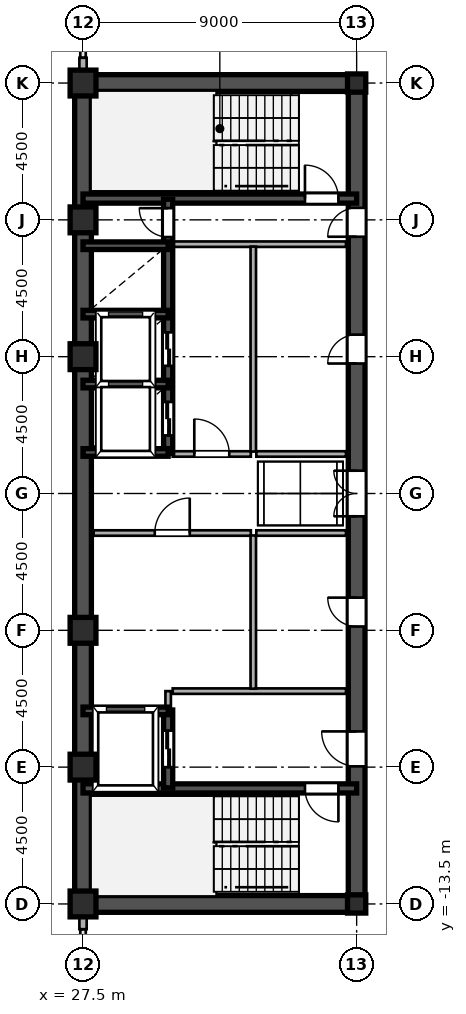
"""IFC4 building model, lengths in metres.
Left out: names, types, materials, properties, quantities, classifications, styles, units other than length and angle.
Written with IfcOpenShell. Run it as: python <this file> out.ifc"""

import sys

from ifc_helpers import new_model, si_unit, direction, frame, frame_2d, origin, origin_2d, place, context, subcontext, project, spatial, rectangle, hollow_rectangle, i_section, extrude, source, transform, mapped, element, fill, save


model = new_model("IFC4")
c1 = context("Model", 3, precision=1e-05, world=origin(), true_north=direction((0.0, 1.0)))
c2 = subcontext(c1, "Body", "Model", "MODEL_VIEW")
j1 = project(units=[si_unit("LENGTHUNIT", "METRE"), si_unit("PLANEANGLEUNIT", "RADIAN")], contexts=[c1])
p1 = place(None, origin())
s1 = spatial("IfcSite", under=j1, at=p1, CompositionType="ELEMENT")
p2 = place(p1, origin())
s2 = spatial("IfcBuilding", under=s1, at=p2, CompositionType="ELEMENT")
p3 = place(p2, frame((0.0, 0.0, 158.4)))
s3 = spatial("IfcBuildingStorey", under=s2, at=p3, CompositionType="ELEMENT", Elevation=158.4)
m1 = source(origin(), c2, "Body", "SweptSolid", [
    extrude(hollow_rectangle(XDim=0.85, YDim=0.85, WallThickness=0.036, at=origin_2d()), origin(), (0.0, 0.0, 1.0), 3.6),
])
for number, where, z_axis, x_axis in (
    (1, (27.5, -13.5, 0.0), (0.0, 0.0, 1.0), (1.0, 0.0, 0.0)),
    (2, (27.5, -9.0, 0.0), (0.0, 0.0, 1.0), (1.0, 0.0, 0.0)),
    (3, (27.5, -4.5, 0.0), (0.0, 0.0, 1.0), (1.0, 0.0, 0.0)),
    (4, (27.5, 4.5, 0.0), (0.0, 0.0, 1.0), (1.0, 0.0, 0.0)),
    (5, (27.5, 9.0, 0.0), (0.0, 0.0, 1.0), (1.0, 0.0, 0.0)),
    (6, (27.5, 13.5, 0.0), (0.0, 0.0, 1.0), (1.0, 0.0, 0.0)),
):
    element("IfcColumn", number, at=place(p3, frame(where, z_axis=z_axis, x_axis=x_axis)), inside=s3, PredefinedType="COLUMN", context=c2, shape_type="MappedRepresentation", body=[
        mapped(m1, transform((0.0, 0.0, 0.0), scale=1.0)),
    ])
m2 = source(origin(), c2, "Body", "SweptSolid", [
    extrude(i_section(OverallWidth=0.6, OverallDepth=0.6, WebThickness=0.025, FlangeThickness=0.04, at=origin_2d()), origin(), (0.0, 0.0, 1.0), 3.6),
])
for number, where, z_axis, x_axis in (
    (7, (36.5, -13.5, 0.0), (0.0, 0.0, 1.0), (1.0, 0.0, 0.0)),
    (8, (36.5, 13.5, 0.0), (0.0, 0.0, 1.0), (1.0, 0.0, 0.0)),
):
    element("IfcColumn", number, at=place(p3, frame(where, z_axis=z_axis, x_axis=x_axis)), inside=s3, PredefinedType="COLUMN", context=c2, shape_type="MappedRepresentation", body=[
        mapped(m2, transform((0.0, 0.0, 0.0), scale=1.0)),
    ])
for number, where, z_axis, x_axis in (
    (9, (27.5, -14.33, 0.0), (0.0, 0.0, 1.0), (0.0, 1.0, 0.0)),
    (10, (27.5, 13.78, 0.0), (0.0, 0.0, 1.0), (0.0, 1.0, 0.0)),
):
    element("IfcWall", number, at=place(p3, frame(where, z_axis=z_axis, x_axis=x_axis)), inside=s3, PredefinedType="SOLIDWALL", context=c2, shape_type="SweptSolid", body=[
        extrude(rectangle(XDim=0.55, YDim=0.24, at=frame_2d((0.275, 0.0))), origin(), (0.0, 0.0, 1.0), 2.84),
    ])
for number, where, z_axis, x_axis in (
    (11, (27.5, -13.5, 0.0), (0.0, 0.0, 1.0), (0.0, 1.0, 0.0)),
    (12, (27.5, 1.3, 0.0), (0.0, 0.0, 1.0), (0.0, 1.0, 0.0)),
):
    element("IfcWall", number, at=place(p3, frame(where, z_axis=z_axis, x_axis=x_axis)), inside=s3, PredefinedType="SHEAR", context=c2, shape_type="SweptSolid", body=[
        extrude(rectangle(XDim=12.2, YDim=0.55, at=frame_2d((6.1, 0.0))), origin(), (0.0, 0.0, 1.0), 3.34),
    ])
p4 = place(p3, frame((27.5, -1.3, 0.0), z_axis=(0.0, 0.0, 1.0), x_axis=(0.0, 1.0, 0.0)))
e13 = element("IfcWall", 13, at=p4, inside=s3, PredefinedType="SHEAR", context=c2, shape_type="SweptSolid", body=[
    extrude(rectangle(XDim=2.6, YDim=0.55, at=frame_2d((1.3, 0.0))), origin(), (0.0, 0.0, 1.0), 3.34),
])
for number, where, z_axis, x_axis in (
    (14, (27.5, -13.5, 0.0), (0.0, 0.0, 1.0), (1.0, 0.0, 0.0)),
    (15, (27.5, 13.5, 0.0), (0.0, 0.0, 1.0), (1.0, 0.0, 0.0)),
):
    element("IfcWall", number, at=place(p3, frame(where, z_axis=z_axis, x_axis=x_axis)), inside=s3, PredefinedType="SHEAR", context=c2, shape_type="SweptSolid", body=[
        extrude(rectangle(XDim=9.0, YDim=0.55, at=frame_2d((4.5, 0.0))), origin(), (0.0, 0.0, 1.0), 3.34),
    ])
p5 = place(p3, frame((36.5, -13.65, 0.0), z_axis=(0.0, 0.0, 1.0), x_axis=(0.0, 1.0, 0.0)))
e16 = element("IfcWall", 16, at=p5, inside=s3, PredefinedType="SHEAR", context=c2, shape_type="SweptSolid", body=[
    extrude(rectangle(XDim=7.15, YDim=0.55, at=frame_2d((3.575, 0.0))), origin(), (0.0, 0.0, 1.0), 3.34),
])
p6 = place(p5, frame((4.675, 0.0, 0.0)))
e17 = element("IfcOpeningElement", 17, at=p6, cuts=e16, PredefinedType="OPENING", context=c2, shape_type="SweptSolid", body=[
    extrude(rectangle(XDim=1.15, YDim=2.2, at=frame_2d((0.575, 1.1))), frame((0.0, 0.285, 0.0), z_axis=(0.0, -1.0, 0.0), x_axis=(1.0, 0.0, 0.0)), (0.0, 0.0, 1.0), 0.57),
])
p7 = place(p3, frame((36.5, -1.3, 0.0), z_axis=(0.0, 0.0, 1.0), x_axis=(0.0, 1.0, 0.0)))
e18 = element("IfcWall", 18, at=p7, inside=s3, PredefinedType="SHEAR", context=c2, shape_type="SweptSolid", body=[
    extrude(rectangle(XDim=2.6, YDim=0.55, at=frame_2d((1.3, 0.0))), origin(), (0.0, 0.0, 1.0), 3.34),
])
p8 = place(p7, frame((0.55, 0.0, 0.0)))
e19 = element("IfcOpeningElement", 19, at=p8, cuts=e18, PredefinedType="OPENING", context=c2, shape_type="SweptSolid", body=[
    extrude(rectangle(XDim=1.5, YDim=2.3, at=frame_2d((0.75, 1.15))), frame((0.0, 0.285, 0.0), z_axis=(0.0, -1.0, 0.0), x_axis=(1.0, 0.0, 0.0)), (0.0, 0.0, 1.0), 0.57),
])
p9 = place(p3, frame((36.5, 8.2, 0.0), z_axis=(0.0, 0.0, 1.0), x_axis=(0.0, 1.0, 0.0)))
e20 = element("IfcWall", 20, at=p9, inside=s3, PredefinedType="SHEAR", context=c2, shape_type="SweptSolid", body=[
    extrude(rectangle(XDim=5.45, YDim=0.55, at=frame_2d((2.725, 0.0))), origin(), (0.0, 0.0, 1.0), 3.34),
])
p10 = place(p9, frame((0.245, 0.0, 0.0)))
e21 = element("IfcOpeningElement", 21, at=p10, cuts=e20, PredefinedType="OPENING", context=c2, shape_type="SweptSolid", body=[
    extrude(rectangle(XDim=0.95, YDim=2.15, at=frame_2d((0.475, 1.075))), frame((0.0, 0.285, 0.0), z_axis=(0.0, -1.0, 0.0), x_axis=(1.0, 0.0, 0.0)), (0.0, 0.0, 1.0), 0.57),
])
p11 = place(p3, frame((36.5, -6.5, 0.0), z_axis=(0.0, 0.0, 1.0), x_axis=(0.0, 1.0, 0.0)))
e22 = element("IfcWall", 22, at=p11, inside=s3, PredefinedType="SHEAR", context=c2, shape_type="SweptSolid", body=[
    extrude(rectangle(XDim=5.2, YDim=0.55, at=frame_2d((2.6, 0.0))), origin(), (0.0, 0.0, 1.0), 3.34),
])
p12 = place(p11, frame((2.125, 0.0, 0.0)))
e23 = element("IfcOpeningElement", 23, at=p12, cuts=e22, PredefinedType="OPENING", context=c2, shape_type="SweptSolid", body=[
    extrude(rectangle(XDim=0.95, YDim=2.15, at=frame_2d((0.475, 1.075))), frame((0.0, 0.285, 0.0), z_axis=(0.0, -1.0, 0.0), x_axis=(1.0, 0.0, 0.0)), (0.0, 0.0, 1.0), 0.57),
])
p13 = place(p3, frame((36.5, 1.3, 0.0), z_axis=(0.0, 0.0, 1.0), x_axis=(0.0, 1.0, 0.0)))
e24 = element("IfcWall", 24, at=p13, inside=s3, PredefinedType="SHEAR", context=c2, shape_type="SweptSolid", body=[
    extrude(rectangle(XDim=6.9, YDim=0.55, at=frame_2d((3.45, 0.0))), origin(), (0.0, 0.0, 1.0), 3.34),
])
p14 = place(p13, frame((2.975, 0.0, 0.0)))
e25 = element("IfcOpeningElement", 25, at=p14, cuts=e24, PredefinedType="OPENING", context=c2, shape_type="SweptSolid", body=[
    extrude(rectangle(XDim=0.95, YDim=2.15, at=frame_2d((0.475, 1.075))), frame((0.0, 0.285, 0.0), z_axis=(0.0, -1.0, 0.0), x_axis=(1.0, 0.0, 0.0)), (0.0, 0.0, 1.0), 0.57),
])
p15 = place(p3, frame((27.5, -9.7, 0.0), z_axis=(0.0, 0.0, 1.0), x_axis=(1.0, 0.0, 0.0)))
e26 = element("IfcWall", 26, at=p15, inside=s3, PredefinedType="SHEAR", context=c2, shape_type="SweptSolid", body=[
    extrude(rectangle(XDim=9.0, YDim=0.3, at=frame_2d((4.5, 0.0))), origin(), (0.0, 0.0, 1.0), 3.34),
])
p16 = place(p15, frame((7.3, 0.0, 0.0)))
e27 = element("IfcOpeningElement", 27, at=p16, cuts=e26, PredefinedType="OPENING", context=c2, shape_type="SweptSolid", body=[
    extrude(rectangle(XDim=1.1, YDim=2.2, at=frame_2d((0.55, 1.1))), frame((0.0, 0.16, 0.0), z_axis=(0.0, -1.0, 0.0), x_axis=(1.0, 0.0, 0.0)), (0.0, 0.0, 1.0), 0.32),
])
p17 = place(p3, frame((27.5, 9.7, 0.0), z_axis=(0.0, 0.0, 1.0), x_axis=(1.0, 0.0, 0.0)))
e28 = element("IfcWall", 28, at=p17, inside=s3, PredefinedType="SHEAR", context=c2, shape_type="SweptSolid", body=[
    extrude(rectangle(XDim=9.0, YDim=0.3, at=frame_2d((4.5, 0.0))), origin(), (0.0, 0.0, 1.0), 3.34),
])
p18 = place(p17, frame((7.3, 0.0, 0.0)))
e29 = element("IfcOpeningElement", 29, at=p18, cuts=e28, PredefinedType="OPENING", context=c2, shape_type="SweptSolid", body=[
    extrude(rectangle(XDim=1.1, YDim=2.2, at=frame_2d((0.55, 1.1))), frame((0.0, 0.16, 0.0), z_axis=(0.0, -1.0, 0.0), x_axis=(1.0, 0.0, 0.0)), (0.0, 0.0, 1.0), 0.32),
])
for number, where, z_axis, x_axis in (
    (30, (27.5, -7.15, 0.0), (0.0, 0.0, 1.0), (1.0, 0.0, 0.0)),
    (31, (27.5, 1.35, 0.0), (0.0, 0.0, 1.0), (1.0, 0.0, 0.0)),
    (32, (27.5, 3.6, 0.0), (0.0, 0.0, 1.0), (1.0, 0.0, 0.0)),
    (33, (27.5, 5.9, 0.0), (0.0, 0.0, 1.0), (1.0, 0.0, 0.0)),
    (34, (27.5, 8.15, 0.0), (0.0, 0.0, 1.0), (1.0, 0.0, 0.0)),
):
    element("IfcWall", number, at=place(p3, frame(where, z_axis=z_axis, x_axis=x_axis)), inside=s3, PredefinedType="SHEAR", context=c2, shape_type="SweptSolid", body=[
        extrude(rectangle(XDim=2.8, YDim=0.25, at=frame_2d((1.4, 0.0))), origin(), (0.0, 0.0, 1.0), 3.34),
    ])
p19 = place(p3, frame((30.3, -9.68, 0.0), z_axis=(0.0, 0.0, 1.0), x_axis=(0.0, 1.0, 0.0)))
e35 = element("IfcWall", 35, at=p19, inside=s3, PredefinedType="SHEAR", context=c2, shape_type="SweptSolid", body=[
    extrude(rectangle(XDim=2.56, YDim=0.3, at=frame_2d((1.28, 0.0))), origin(), (0.0, 0.0, 1.0), 3.34),
])
p20 = place(p19, frame((0.68, 0.0, 0.0)))
e36 = element("IfcOpeningElement", 36, at=p20, cuts=e35, PredefinedType="OPENING", context=c2, shape_type="SweptSolid", body=[
    extrude(rectangle(XDim=1.2, YDim=2.25, at=frame_2d((0.6, 1.125))), frame((0.0, 0.16, 0.0), z_axis=(0.0, -1.0, 0.0), x_axis=(1.0, 0.0, 0.0)), (0.0, 0.0, 1.0), 0.32),
])
p21 = place(p3, frame((30.3, 1.32, 0.0), z_axis=(0.0, 0.0, 1.0), x_axis=(0.0, 1.0, 0.0)))
e37 = element("IfcWall", 37, at=p21, inside=s3, PredefinedType="SHEAR", context=c2, shape_type="SweptSolid", body=[
    extrude(rectangle(XDim=2.28, YDim=0.3, at=frame_2d((1.14, 0.0))), origin(), (0.0, 0.0, 1.0), 3.34),
])
p22 = place(p21, frame((0.59, 0.0, 0.0)))
e38 = element("IfcOpeningElement", 38, at=p22, cuts=e37, PredefinedType="OPENING", context=c2, shape_type="SweptSolid", body=[
    extrude(rectangle(XDim=1.1, YDim=2.2, at=frame_2d((0.55, 1.1))), frame((0.0, 0.16, 0.0), z_axis=(0.0, -1.0, 0.0), x_axis=(1.0, 0.0, 0.0)), (0.0, 0.0, 1.0), 0.32),
])
p23 = place(p3, frame((30.3, 3.6, 0.0), z_axis=(0.0, 0.0, 1.0), x_axis=(0.0, 1.0, 0.0)))
e39 = element("IfcWall", 39, at=p23, inside=s3, PredefinedType="SHEAR", context=c2, shape_type="SweptSolid", body=[
    extrude(rectangle(XDim=2.3, YDim=0.3, at=frame_2d((1.15, 0.0))), origin(), (0.0, 0.0, 1.0), 3.34),
])
p24 = place(p23, frame((0.6, 0.0, 0.0)))
e40 = element("IfcOpeningElement", 40, at=p24, cuts=e39, PredefinedType="OPENING", context=c2, shape_type="SweptSolid", body=[
    extrude(rectangle(XDim=1.1, YDim=2.2, at=frame_2d((0.55, 1.1))), frame((0.0, 0.16, 0.0), z_axis=(0.0, -1.0, 0.0), x_axis=(1.0, 0.0, 0.0)), (0.0, 0.0, 1.0), 0.32),
])
p25 = place(p3, frame((30.3, 5.9, 0.0), z_axis=(0.0, 0.0, 1.0), x_axis=(0.0, 1.0, 0.0)))
e41 = element("IfcWall", 41, at=p25, inside=s3, PredefinedType="SHEAR", context=c2, shape_type="SweptSolid", body=[
    extrude(rectangle(XDim=2.25, YDim=0.3, at=frame_2d((1.125, 0.0))), origin(), (0.0, 0.0, 1.0), 3.34),
])
p26 = place(p3, frame((30.3, 8.15, 0.0), z_axis=(0.0, 0.0, 1.0), x_axis=(0.0, 1.0, 0.0)))
e42 = element("IfcWall", 42, at=p26, inside=s3, PredefinedType="SHEAR", context=c2, shape_type="SweptSolid", body=[
    extrude(rectangle(XDim=1.53, YDim=0.3, at=frame_2d((0.765, 0.0))), origin(), (0.0, 0.0, 1.0), 3.34),
])
p27 = place(p26, frame((0.285, 0.0, 0.0)))
e43 = element("IfcOpeningElement", 43, at=p27, cuts=e42, PredefinedType="OPENING", context=c2, shape_type="SweptSolid", body=[
    extrude(rectangle(XDim=0.95, YDim=2.15, at=frame_2d((0.475, 1.075))), frame((0.0, 0.16, 0.0), z_axis=(0.0, -1.0, 0.0), x_axis=(1.0, 0.0, 0.0)), (0.0, 0.0, 1.0), 0.32),
])
p28 = place(p3, frame((30.45, -6.5, 0.0), z_axis=(0.0, 0.0, 1.0), x_axis=(1.0, 0.0, 0.0)))
e44 = element("IfcWall", 44, at=p28, inside=s3, PredefinedType="PARTITIONING", context=c2, shape_type="SweptSolid", body=[
    extrude(rectangle(XDim=5.7, YDim=0.18, at=frame_2d((2.85, 0.0))), origin(), (0.0, 0.0, 1.0), 3.34),
])
p29 = place(p3, frame((30.3, -7.12, 0.0), z_axis=(0.0, 0.0, 1.0), x_axis=(0.0, 1.0, 0.0)))
e45 = element("IfcWall", 45, at=p29, inside=s3, PredefinedType="PARTITIONING", context=c2, shape_type="SweptSolid", body=[
    extrude(rectangle(XDim=0.62, YDim=0.18, at=frame_2d((0.31, 0.0))), origin(), (0.0, 0.0, 1.0), 3.34),
])
p30 = place(p3, frame((30.45, 8.2, 0.0), z_axis=(0.0, 0.0, 1.0), x_axis=(1.0, 0.0, 0.0)))
e46 = element("IfcWall", 46, at=p30, inside=s3, PredefinedType="PARTITIONING", context=c2, shape_type="SweptSolid", body=[
    extrude(rectangle(XDim=5.7, YDim=0.18, at=frame_2d((2.85, 0.0))), origin(), (0.0, 0.0, 1.0), 3.34),
])
p31 = place(p3, frame((33.1, -6.42, 0.0), z_axis=(0.0, 0.0, 1.0), x_axis=(0.0, 1.0, 0.0)))
e47 = element("IfcWall", 47, at=p31, inside=s3, PredefinedType="PARTITIONING", context=c2, shape_type="SweptSolid", body=[
    extrude(rectangle(XDim=5.04, YDim=0.18, at=frame_2d((2.52, 0.0))), origin(), (0.0, 0.0, 1.0), 3.34),
])
p32 = place(p3, frame((33.1, 1.38, 0.0), z_axis=(0.0, 0.0, 1.0), x_axis=(0.0, 1.0, 0.0)))
e48 = element("IfcWall", 48, at=p32, inside=s3, PredefinedType="PARTITIONING", context=c2, shape_type="SweptSolid", body=[
    extrude(rectangle(XDim=6.74, YDim=0.18, at=frame_2d((3.37, 0.0))), origin(), (0.0, 0.0, 1.0), 3.34),
])
p33 = place(p3, frame((27.85, -1.3, 0.0), z_axis=(0.0, 0.0, 1.0), x_axis=(1.0, 0.0, 0.0)))
e49 = element("IfcWall", 49, at=p33, inside=s3, PredefinedType="PARTITIONING", context=c2, shape_type="SweptSolid", body=[
    extrude(rectangle(XDim=5.17, YDim=0.18, at=frame_2d((2.585, 0.0))), origin(), (0.0, 0.0, 1.0), 3.34),
])
p34 = place(p33, frame((2.01, 0.0, 0.0)))
e50 = element("IfcOpeningElement", 50, at=p34, cuts=e49, PredefinedType="OPENING", context=c2, shape_type="SweptSolid", body=[
    extrude(rectangle(XDim=1.15, YDim=2.2, at=frame_2d((0.575, 1.1))), frame((0.0, 0.1, 0.0), z_axis=(0.0, -1.0, 0.0), x_axis=(1.0, 0.0, 0.0)), (0.0, 0.0, 1.0), 0.2),
])
p35 = place(p3, frame((30.45, 1.3, 0.0), z_axis=(0.0, 0.0, 1.0), x_axis=(1.0, 0.0, 0.0)))
e51 = element("IfcWall", 51, at=p35, inside=s3, PredefinedType="PARTITIONING", context=c2, shape_type="SweptSolid", body=[
    extrude(rectangle(XDim=2.57, YDim=0.18, at=frame_2d((1.285, 0.0))), origin(), (0.0, 0.0, 1.0), 3.34),
])
p36 = place(p35, frame((0.71, 0.0, 0.0)))
e52 = element("IfcOpeningElement", 52, at=p36, cuts=e51, PredefinedType="OPENING", context=c2, shape_type="SweptSolid", body=[
    extrude(rectangle(XDim=1.15, YDim=2.2, at=frame_2d((0.575, 1.1))), frame((0.0, 0.1, 0.0), z_axis=(0.0, -1.0, 0.0), x_axis=(1.0, 0.0, 0.0)), (0.0, 0.0, 1.0), 0.2),
])
for number, where, z_axis, x_axis in (
    (53, (33.2, -1.3, 0.0), (0.0, 0.0, 1.0), (1.0, 0.0, 0.0)),
    (54, (33.2, 1.3, 0.0), (0.0, 0.0, 1.0), (1.0, 0.0, 0.0)),
):
    element("IfcWall", number, at=place(p3, frame(where, z_axis=z_axis, x_axis=x_axis)), inside=s3, PredefinedType="PARTITIONING", context=c2, shape_type="SweptSolid", body=[
        extrude(rectangle(XDim=2.95, YDim=0.18, at=frame_2d((1.475, 0.0))), origin(), (0.0, 0.0, 1.0), 3.34),
    ])
m3 = source(origin(), c2, "Body", "SweptSolid", [
    extrude(rectangle(XDim=1.15, YDim=2.2, at=frame_2d((0.575, 1.1))), frame((0.0, 0.025, 0.0), z_axis=(0.0, -1.0, 0.0), x_axis=(1.0, 0.0, 0.0)), (0.0, 0.0, 1.0), 0.05),
])
p37 = place(p6, origin())
e55 = element("IfcDoor", 55, at=p37, inside=s3, OperationType="SINGLE_SWING_RIGHT", PredefinedType="DOOR", context=c2, shape_type="MappedRepresentation", body=[
    mapped(m3, transform((0.0, 0.0, 0.0), scale=1.0)),
])
fill(e17, e55)
m4 = source(origin(), c2, "Body", "SweptSolid", [
    extrude(rectangle(XDim=1.5, YDim=2.3, at=frame_2d((0.75, 1.15))), frame((0.0, 0.025, 0.0), z_axis=(0.0, -1.0, 0.0), x_axis=(1.0, 0.0, 0.0)), (0.0, 0.0, 1.0), 0.05),
])
p38 = place(p8, origin())
e56 = element("IfcDoor", 56, at=p38, inside=s3, OperationType="DOUBLE_SWING_LEFT", PredefinedType="DOOR", context=c2, shape_type="MappedRepresentation", body=[
    mapped(m4, transform((0.0, 0.0, 0.0), scale=1.0)),
])
fill(e19, e56)
m5 = source(origin(), c2, "Body", "SweptSolid", [
    extrude(rectangle(XDim=0.95, YDim=2.15, at=frame_2d((0.475, 1.075))), frame((0.0, 0.025, 0.0), z_axis=(0.0, -1.0, 0.0), x_axis=(1.0, 0.0, 0.0)), (0.0, 0.0, 1.0), 0.05),
])
p39 = place(p10, origin())
e57 = element("IfcDoor", 57, at=p39, inside=s3, OperationType="SINGLE_SWING_LEFT", PredefinedType="DOOR", context=c2, shape_type="MappedRepresentation", body=[
    mapped(m5, transform((0.0, 0.0, 0.0), scale=1.0)),
])
fill(e21, e57)
p40 = place(p12, origin())
e58 = element("IfcDoor", 58, at=p40, inside=s3, OperationType="SINGLE_SWING_RIGHT", PredefinedType="DOOR", context=c2, shape_type="MappedRepresentation", body=[
    mapped(m5, transform((0.0, 0.0, 0.0), scale=1.0)),
])
fill(e23, e58)
p41 = place(p14, origin())
e59 = element("IfcDoor", 59, at=p41, inside=s3, OperationType="SINGLE_SWING_LEFT", PredefinedType="DOOR", context=c2, shape_type="MappedRepresentation", body=[
    mapped(m5, transform((0.0, 0.0, 0.0), scale=1.0)),
])
fill(e25, e59)
m6 = source(origin(), c2, "Body", "SweptSolid", [
    extrude(rectangle(XDim=1.1, YDim=2.2, at=frame_2d((0.55, 1.1))), frame((0.0, 0.025, 0.0), z_axis=(0.0, -1.0, 0.0), x_axis=(1.0, 0.0, 0.0)), (0.0, 0.0, 1.0), 0.05),
])
p42 = place(p16, frame((1.1, 0.0, 0.0), z_axis=(0.0, 0.0, 1.0), x_axis=(-1.0, 0.0, 0.0)))
e60 = element("IfcDoor", 60, at=p42, inside=s3, OperationType="SINGLE_SWING_RIGHT", PredefinedType="DOOR", context=c2, shape_type="MappedRepresentation", body=[
    mapped(m6, transform((0.0, 0.0, 0.0), scale=1.0)),
])
fill(e27, e60)
p43 = place(p18, origin())
e61 = element("IfcDoor", 61, at=p43, inside=s3, OperationType="SINGLE_SWING_LEFT", PredefinedType="DOOR", context=c2, shape_type="MappedRepresentation", body=[
    mapped(m6, transform((0.0, 0.0, 0.0), scale=1.0)),
])
fill(e29, e61)
m7 = source(origin(), c2, "Body", "SweptSolid", [
    extrude(rectangle(XDim=1.2, YDim=2.25, at=frame_2d((0.6, 1.125))), frame((0.0, 0.025, 0.0), z_axis=(0.0, -1.0, 0.0), x_axis=(1.0, 0.0, 0.0)), (0.0, 0.0, 1.0), 0.05),
])
p44 = place(p20, origin())
e62 = element("IfcDoor", 62, at=p44, inside=s3, OperationType="DOUBLE_DOOR_SLIDING", PredefinedType="DOOR", context=c2, shape_type="MappedRepresentation", body=[
    mapped(m7, transform((0.0, 0.0, 0.0), scale=1.0)),
])
fill(e36, e62)
m8 = source(origin(), c2, "Body", "SweptSolid", [
    extrude(rectangle(XDim=1.1, YDim=2.2, at=frame_2d((0.55, 1.1))), frame((0.0, 0.025, 0.0), z_axis=(0.0, -1.0, 0.0), x_axis=(1.0, 0.0, 0.0)), (0.0, 0.0, 1.0), 0.05),
])
p45 = place(p22, origin())
e63 = element("IfcDoor", 63, at=p45, inside=s3, OperationType="DOUBLE_DOOR_SLIDING", PredefinedType="DOOR", context=c2, shape_type="MappedRepresentation", body=[
    mapped(m8, transform((0.0, 0.0, 0.0), scale=1.0)),
])
fill(e38, e63)
p46 = place(p24, origin())
e64 = element("IfcDoor", 64, at=p46, inside=s3, OperationType="DOUBLE_DOOR_SLIDING", PredefinedType="DOOR", context=c2, shape_type="MappedRepresentation", body=[
    mapped(m8, transform((0.0, 0.0, 0.0), scale=1.0)),
])
fill(e40, e64)
p47 = place(p27, origin())
e65 = element("IfcDoor", 65, at=p47, inside=s3, OperationType="SINGLE_SWING_RIGHT", PredefinedType="DOOR", context=c2, shape_type="MappedRepresentation", body=[
    mapped(m5, transform((0.0, 0.0, 0.0), scale=1.0)),
])
fill(e43, e65)
p48 = place(p34, origin())
e66 = element("IfcDoor", 66, at=p48, inside=s3, OperationType="SINGLE_SWING_RIGHT", PredefinedType="DOOR", context=c2, shape_type="MappedRepresentation", body=[
    mapped(m3, transform((0.0, 0.0, 0.0), scale=1.0)),
])
fill(e50, e66)
p49 = place(p36, origin())
e67 = element("IfcDoor", 67, at=p49, inside=s3, OperationType="SINGLE_SWING_LEFT", PredefinedType="DOOR", context=c2, shape_type="MappedRepresentation", body=[
    mapped(m3, transform((0.0, 0.0, 0.0), scale=1.0)),
])
fill(e52, e67)
save(model, sys.argv[1])
